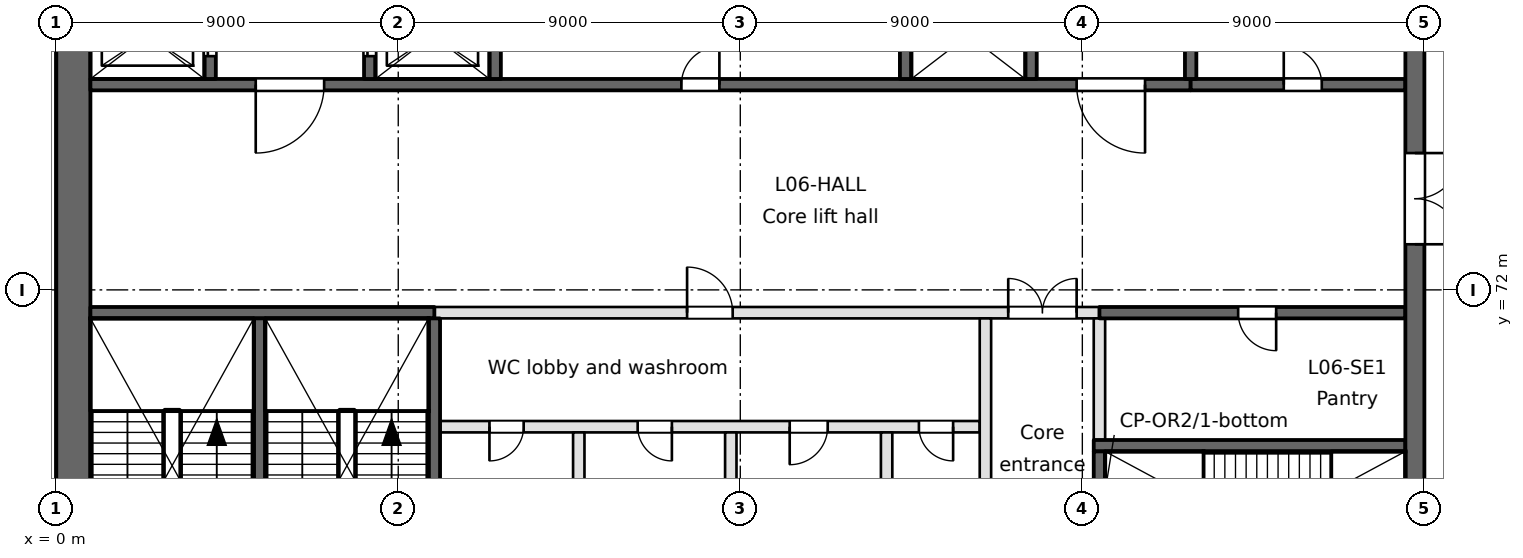
"""IFC4 building model, lengths in metres.
Left out: names, types, materials, properties, quantities, classifications, styles, units other than length and angle.
Written with IfcOpenShell. Run it as: python <this file> out.ifc"""

import sys

from ifc_helpers import new_model, si_unit, direction, frame, frame_2d, origin, place, context, subcontext, project, spatial, rectangle, extrude, element, fill, save


model = new_model("IFC4")
c1 = context("Model", 3, precision=1e-05, world=origin(), true_north=direction((0.0, 1.0)))
c2 = subcontext(c1, "Body", "Model", "MODEL_VIEW")
j1 = project(units=[si_unit("LENGTHUNIT", "METRE"), si_unit("PLANEANGLEUNIT", "RADIAN")], contexts=[c1])
p1 = place(None, origin())
s1 = spatial("IfcSite", under=j1, at=p1, CompositionType="ELEMENT")
p2 = place(p1, origin())
s2 = spatial("IfcBuilding", under=s1, at=p2, CompositionType="ELEMENT")
p3 = place(p2, frame((0.0, 0.0, 31.2)))
s3 = spatial("IfcBuildingStorey", under=s2, at=p3, CompositionType="ELEMENT", Elevation=31.2)
p4 = place(p3, frame((0.45, 94.5, 0.0), z_axis=(0.0, 0.0, 1.0), x_axis=(0.0, -1.0, 0.0)))
e1 = element("IfcWall", 1, at=p4, inside=s3, PredefinedType="SHEAR", context=c2, shape_type="SweptSolid", body=[
    extrude(rectangle(XDim=66.085, YDim=0.9, at=frame_2d((33.042, 0.0))), origin(), (0.0, 0.0, 1.0), 4.6),
])
p5 = place(p3, frame((27.3, 67.9, -0.45), z_axis=(0.0, 0.0, 1.0), x_axis=(1.0, 0.0, 0.0)))
e2 = element("IfcWall", 2, at=p5, inside=s3, PredefinedType="SOLIDWALL", context=c2, shape_type="SweptSolid", body=[
    extrude(rectangle(XDim=8.2, YDim=0.3, at=frame_2d((4.1, 0.0))), origin(), (0.0, 0.0, 1.0), 4.65),
])
p6 = place(p3, frame((10.1, 68.4, 0.0), z_axis=(0.0, 0.0, 1.0), x_axis=(1.0, 0.0, 0.0)))
e3 = element("IfcWall", 3, at=p6, inside=s3, PredefinedType="PARTITIONING", context=c2, shape_type="SweptSolid", body=[
    extrude(rectangle(XDim=14.2, YDim=0.3, at=frame_2d((7.1, 0.0))), origin(), (0.0, 0.0, 1.0), 4.2),
])
p7 = place(p6, frame((1.3, 0.0, 0.0)))
e4 = element("IfcOpeningElement", 4, at=p7, cuts=e3, PredefinedType="OPENING", context=c2, shape_type="SweptSolid", body=[
    extrude(rectangle(XDim=0.9, YDim=2.1, at=frame_2d((0.45, 1.05))), frame((0.0, 0.15, 0.0), z_axis=(0.0, -1.0, 0.0), x_axis=(1.0, 0.0, 0.0)), (0.0, 0.0, 1.0), 0.3),
])
p8 = place(p6, frame((5.2, 0.0, 0.0)))
e5 = element("IfcOpeningElement", 5, at=p8, cuts=e3, PredefinedType="OPENING", context=c2, shape_type="SweptSolid", body=[
    extrude(rectangle(XDim=0.9, YDim=2.1, at=frame_2d((0.45, 1.05))), frame((0.0, 0.15, 0.0), z_axis=(0.0, -1.0, 0.0), x_axis=(1.0, 0.0, 0.0)), (0.0, 0.0, 1.0), 0.3),
])
p9 = place(p6, frame((9.2, 0.0, 0.0)))
e6 = element("IfcOpeningElement", 6, at=p9, cuts=e3, PredefinedType="OPENING", context=c2, shape_type="SweptSolid", body=[
    extrude(rectangle(XDim=1.0, YDim=2.1, at=frame_2d((0.5, 1.05))), frame((0.0, 0.15, 0.0), z_axis=(0.0, -1.0, 0.0), x_axis=(1.0, 0.0, 0.0)), (0.0, 0.0, 1.0), 0.3),
])
p10 = place(p6, frame((12.6, 0.0, 0.0)))
e7 = element("IfcOpeningElement", 7, at=p10, cuts=e3, PredefinedType="OPENING", context=c2, shape_type="SweptSolid", body=[
    extrude(rectangle(XDim=0.9, YDim=2.1, at=frame_2d((0.45, 1.05))), frame((0.0, 0.15, 0.0), z_axis=(0.0, -1.0, 0.0), x_axis=(1.0, 0.0, 0.0)), (0.0, 0.0, 1.0), 0.3),
])
p11 = place(p3, frame((0.9, 71.4, -0.45), z_axis=(0.0, 0.0, 1.0), x_axis=(1.0, 0.0, 0.0)))
e8 = element("IfcWall", 8, at=p11, inside=s3, PredefinedType="SOLIDWALL", context=c2, shape_type="SweptSolid", body=[
    extrude(rectangle(XDim=9.05, YDim=0.3, at=frame_2d((4.525, 0.0))), origin(), (0.0, 0.0, 1.0), 4.65),
])
p12 = place(p3, frame((9.95, 71.4, 0.0), z_axis=(0.0, 0.0, 1.0), x_axis=(1.0, 0.0, 0.0)))
e9 = element("IfcWall", 9, at=p12, inside=s3, PredefinedType="PARTITIONING", context=c2, shape_type="SweptSolid", body=[
    extrude(rectangle(XDim=17.5, YDim=0.3, at=frame_2d((8.75, 0.0))), origin(), (0.0, 0.0, 1.0), 4.2),
])
p13 = place(p12, frame((15.1, 0.0, 0.0)))
e10 = element("IfcOpeningElement", 10, at=p13, cuts=e9, PredefinedType="OPENING", context=c2, shape_type="SweptSolid", body=[
    extrude(rectangle(XDim=1.8, YDim=2.1, at=frame_2d((0.9, 1.05))), frame((0.0, 0.15, 0.0), z_axis=(0.0, -1.0, 0.0), x_axis=(1.0, 0.0, 0.0)), (0.0, 0.0, 1.0), 0.3),
])
p14 = place(p12, frame((6.65, 0.0, 0.0)))
e11 = element("IfcOpeningElement", 11, at=p14, cuts=e9, PredefinedType="OPENING", context=c2, shape_type="SweptSolid", body=[
    extrude(rectangle(XDim=1.2, YDim=2.1, at=frame_2d((0.6, 1.05))), frame((0.0, 0.15, 0.0), z_axis=(0.0, -1.0, 0.0), x_axis=(1.0, 0.0, 0.0)), (0.0, 0.0, 1.0), 0.3),
])
p15 = place(p3, frame((27.45, 71.4, 0.0), z_axis=(0.0, 0.0, 1.0), x_axis=(1.0, 0.0, 0.0)))
e12 = element("IfcWall", 12, at=p15, inside=s3, PredefinedType="SOLIDWALL", context=c2, shape_type="SweptSolid", body=[
    extrude(rectangle(XDim=8.05, YDim=0.3, at=frame_2d((4.025, 0.0))), origin(), (0.0, 0.0, 1.0), 4.2),
])
p16 = place(p15, frame((3.65, 0.0, 0.0)))
e13 = element("IfcOpeningElement", 13, at=p16, cuts=e12, PredefinedType="OPENING", context=c2, shape_type="SweptSolid", body=[
    extrude(rectangle(XDim=1.0, YDim=2.1, at=frame_2d((0.5, 1.05))), frame((0.0, 0.15, 0.0), z_axis=(0.0, -1.0, 0.0), x_axis=(1.0, 0.0, 0.0)), (0.0, 0.0, 1.0), 0.3),
])
p17 = place(p3, frame((0.9, 77.4, -0.45), z_axis=(0.0, 0.0, 1.0), x_axis=(1.0, 0.0, 0.0)))
e14 = element("IfcWall", 14, at=p17, inside=s3, PredefinedType="SOLIDWALL", context=c2, shape_type="SweptSolid", body=[
    extrude(rectangle(XDim=28.95, YDim=0.3, at=frame_2d((14.475, 0.0))), origin(), (0.0, 0.0, 1.0), 4.65),
])
p18 = place(p17, frame((4.35, 0.0, 0.45)))
e15 = element("IfcOpeningElement", 15, at=p18, cuts=e14, PredefinedType="OPENING", context=c2, shape_type="SweptSolid", body=[
    extrude(rectangle(XDim=1.8, YDim=2.1, at=frame_2d((0.9, 1.05))), frame((0.0, 0.15, 0.0), z_axis=(0.0, -1.0, 0.0), x_axis=(1.0, 0.0, 0.0)), (0.0, 0.0, 1.0), 0.3),
])
p19 = place(p17, frame((25.95, 0.0, 0.45)))
e16 = element("IfcOpeningElement", 16, at=p19, cuts=e14, PredefinedType="OPENING", context=c2, shape_type="SweptSolid", body=[
    extrude(rectangle(XDim=1.8, YDim=2.1, at=frame_2d((0.9, 1.05))), frame((0.0, 0.15, 0.0), z_axis=(0.0, -1.0, 0.0), x_axis=(1.0, 0.0, 0.0)), (0.0, 0.0, 1.0), 0.3),
])
p20 = place(p17, frame((15.55, 0.0, 0.45)))
e17 = element("IfcOpeningElement", 17, at=p20, cuts=e14, PredefinedType="OPENING", context=c2, shape_type="SweptSolid", body=[
    extrude(rectangle(XDim=1.0, YDim=2.1, at=frame_2d((0.5, 1.05))), frame((0.0, 0.15, 0.0), z_axis=(0.0, -1.0, 0.0), x_axis=(1.0, 0.0, 0.0)), (0.0, 0.0, 1.0), 0.3),
])
p21 = place(p3, frame((29.85, 77.4, 0.0), z_axis=(0.0, 0.0, 1.0), x_axis=(1.0, 0.0, 0.0)))
e18 = element("IfcWall", 18, at=p21, inside=s3, PredefinedType="SOLIDWALL", context=c2, shape_type="SweptSolid", body=[
    extrude(rectangle(XDim=5.65, YDim=0.3, at=frame_2d((2.825, 0.0))), origin(), (0.0, 0.0, 1.0), 4.2),
])
p22 = place(p21, frame((2.45, 0.0, 0.0)))
e19 = element("IfcOpeningElement", 19, at=p22, cuts=e18, PredefinedType="OPENING", context=c2, shape_type="SweptSolid", body=[
    extrude(rectangle(XDim=1.0, YDim=2.1, at=frame_2d((0.5, 1.05))), frame((0.0, 0.15, 0.0), z_axis=(0.0, -1.0, 0.0), x_axis=(1.0, 0.0, 0.0)), (0.0, 0.0, 1.0), 0.3),
])
p23 = place(p3, frame((4.05, 77.55, -0.45), z_axis=(0.0, 0.0, 1.0), x_axis=(0.0, 1.0, 0.0)))
e20 = element("IfcWall", 20, at=p23, inside=s3, PredefinedType="SOLIDWALL", context=c2, shape_type="SweptSolid", body=[
    extrude(rectangle(XDim=10.1, YDim=0.3, at=frame_2d((5.05, 0.0))), origin(), (0.0, 0.0, 1.0), 4.65),
])
p24 = place(p23, frame((0.6, 0.0, 0.45)))
e21 = element("IfcOpeningElement", 21, at=p24, cuts=e20, PredefinedType="OPENING", context=c2, shape_type="SweptSolid", body=[
    extrude(rectangle(XDim=1.1, YDim=2.1, at=frame_2d((0.55, 1.05))), frame((0.0, 0.15, 0.0), z_axis=(0.0, -1.0, 0.0), x_axis=(1.0, 0.0, 0.0)), (0.0, 0.0, 1.0), 0.3),
])
p25 = place(p23, frame((3.2, 0.0, 0.45)))
e22 = element("IfcOpeningElement", 22, at=p25, cuts=e20, PredefinedType="OPENING", context=c2, shape_type="SweptSolid", body=[
    extrude(rectangle(XDim=1.1, YDim=2.1, at=frame_2d((0.55, 1.05))), frame((0.0, 0.15, 0.0), z_axis=(0.0, -1.0, 0.0), x_axis=(1.0, 0.0, 0.0)), (0.0, 0.0, 1.0), 0.3),
])
p26 = place(p23, frame((5.8, 0.0, 0.45)))
e23 = element("IfcOpeningElement", 23, at=p26, cuts=e20, PredefinedType="OPENING", context=c2, shape_type="SweptSolid", body=[
    extrude(rectangle(XDim=1.1, YDim=2.1, at=frame_2d((0.55, 1.05))), frame((0.0, 0.15, 0.0), z_axis=(0.0, -1.0, 0.0), x_axis=(1.0, 0.0, 0.0)), (0.0, 0.0, 1.0), 0.3),
])
p27 = place(p23, frame((8.4, 0.0, 0.45)))
e24 = element("IfcOpeningElement", 24, at=p27, cuts=e20, PredefinedType="OPENING", context=c2, shape_type="SweptSolid", body=[
    extrude(rectangle(XDim=1.1, YDim=2.1, at=frame_2d((0.55, 1.05))), frame((0.0, 0.15, 0.0), z_axis=(0.0, -1.0, 0.0), x_axis=(1.0, 0.0, 0.0)), (0.0, 0.0, 1.0), 0.3),
])
p28 = place(p3, frame((5.35, 63.5, -0.45), z_axis=(0.0, 0.0, 1.0), x_axis=(0.0, 1.0, 0.0)))
e25 = element("IfcWall", 25, at=p28, inside=s3, PredefinedType="SOLIDWALL", context=c2, shape_type="SweptSolid", body=[
    extrude(rectangle(XDim=7.75, YDim=0.3, at=frame_2d((3.875, 0.0))), origin(), (0.0, 0.0, 1.0), 4.65),
])
p29 = place(p3, frame((8.25, 77.55, -0.45), z_axis=(0.0, 0.0, 1.0), x_axis=(0.0, 1.0, 0.0)))
e26 = element("IfcWall", 26, at=p29, inside=s3, PredefinedType="SOLIDWALL", context=c2, shape_type="SweptSolid", body=[
    extrude(rectangle(XDim=10.1, YDim=0.3, at=frame_2d((5.05, 0.0))), origin(), (0.0, 0.0, 1.0), 4.65),
])
p30 = place(p29, frame((0.6, 0.0, 0.45)))
e27 = element("IfcOpeningElement", 27, at=p30, cuts=e26, PredefinedType="OPENING", context=c2, shape_type="SweptSolid", body=[
    extrude(rectangle(XDim=1.1, YDim=2.1, at=frame_2d((0.55, 1.05))), frame((0.0, 0.15, 0.0), z_axis=(0.0, -1.0, 0.0), x_axis=(1.0, 0.0, 0.0)), (0.0, 0.0, 1.0), 0.3),
])
p31 = place(p29, frame((3.2, 0.0, 0.45)))
e28 = element("IfcOpeningElement", 28, at=p31, cuts=e26, PredefinedType="OPENING", context=c2, shape_type="SweptSolid", body=[
    extrude(rectangle(XDim=1.1, YDim=2.1, at=frame_2d((0.55, 1.05))), frame((0.0, 0.15, 0.0), z_axis=(0.0, -1.0, 0.0), x_axis=(1.0, 0.0, 0.0)), (0.0, 0.0, 1.0), 0.3),
])
p32 = place(p29, frame((5.8, 0.0, 0.45)))
e29 = element("IfcOpeningElement", 29, at=p32, cuts=e26, PredefinedType="OPENING", context=c2, shape_type="SweptSolid", body=[
    extrude(rectangle(XDim=1.1, YDim=2.1, at=frame_2d((0.55, 1.05))), frame((0.0, 0.15, 0.0), z_axis=(0.0, -1.0, 0.0), x_axis=(1.0, 0.0, 0.0)), (0.0, 0.0, 1.0), 0.3),
])
p33 = place(p29, frame((8.4, 0.0, 0.45)))
e30 = element("IfcOpeningElement", 30, at=p33, cuts=e26, PredefinedType="OPENING", context=c2, shape_type="SweptSolid", body=[
    extrude(rectangle(XDim=1.1, YDim=2.1, at=frame_2d((0.55, 1.05))), frame((0.0, 0.15, 0.0), z_axis=(0.0, -1.0, 0.0), x_axis=(1.0, 0.0, 0.0)), (0.0, 0.0, 1.0), 0.3),
])
p34 = place(p3, frame((9.95, 63.5, -0.45), z_axis=(0.0, 0.0, 1.0), x_axis=(0.0, 1.0, 0.0)))
e31 = element("IfcWall", 31, at=p34, inside=s3, PredefinedType="SOLIDWALL", context=c2, shape_type="SweptSolid", body=[
    extrude(rectangle(XDim=7.75, YDim=0.3, at=frame_2d((3.875, 0.0))), origin(), (0.0, 0.0, 1.0), 4.65),
])
p35 = place(p3, frame((11.55, 77.55, -0.45), z_axis=(0.0, 0.0, 1.0), x_axis=(0.0, 1.0, 0.0)))
e32 = element("IfcWall", 32, at=p35, inside=s3, PredefinedType="SOLIDWALL", context=c2, shape_type="SweptSolid", body=[
    extrude(rectangle(XDim=10.1, YDim=0.3, at=frame_2d((5.05, 0.0))), origin(), (0.0, 0.0, 1.0), 4.65),
])
for number, where, z_axis, x_axis in (
    (33, (13.75, 63.5, 0.0), (0.0, 0.0, 1.0), (0.0, 1.0, 0.0)),
    (34, (17.75, 63.5, 0.0), (0.0, 0.0, 1.0), (0.0, 1.0, 0.0)),
    (35, (21.85, 63.5, 0.0), (0.0, 0.0, 1.0), (0.0, 1.0, 0.0)),
):
    element("IfcWall", number, at=place(p3, frame(where, z_axis=z_axis, x_axis=x_axis)), inside=s3, PredefinedType="PARTITIONING", context=c2, shape_type="SweptSolid", body=[
        extrude(rectangle(XDim=4.75, YDim=0.3, at=frame_2d((2.375, 0.0))), origin(), (0.0, 0.0, 1.0), 4.2),
    ])
p36 = place(p3, frame((22.35, 77.55, -0.45), z_axis=(0.0, 0.0, 1.0), x_axis=(0.0, 1.0, 0.0)))
e36 = element("IfcWall", 36, at=p36, inside=s3, PredefinedType="SOLIDWALL", context=c2, shape_type="SweptSolid", body=[
    extrude(rectangle(XDim=10.1, YDim=0.3, at=frame_2d((5.05, 0.0))), origin(), (0.0, 0.0, 1.0), 4.65),
])
p37 = place(p3, frame((24.45, 63.5, 0.0), z_axis=(0.0, 0.0, 1.0), x_axis=(0.0, 1.0, 0.0)))
e37 = element("IfcWall", 37, at=p37, inside=s3, PredefinedType="PARTITIONING", context=c2, shape_type="SweptSolid", body=[
    extrude(rectangle(XDim=7.75, YDim=0.3, at=frame_2d((3.875, 0.0))), origin(), (0.0, 0.0, 1.0), 4.2),
])
p38 = place(p3, frame((25.65, 77.55, -0.45), z_axis=(0.0, 0.0, 1.0), x_axis=(0.0, 1.0, 0.0)))
e38 = element("IfcWall", 38, at=p38, inside=s3, PredefinedType="SOLIDWALL", context=c2, shape_type="SweptSolid", body=[
    extrude(rectangle(XDim=10.1, YDim=0.3, at=frame_2d((5.05, 0.0))), origin(), (0.0, 0.0, 1.0), 4.65),
])
p39 = place(p3, frame((27.45, 63.5, -0.45), z_axis=(0.0, 0.0, 1.0), x_axis=(0.0, 1.0, 0.0)))
e39 = element("IfcWall", 39, at=p39, inside=s3, PredefinedType="SOLIDWALL", context=c2, shape_type="SweptSolid", body=[
    extrude(rectangle(XDim=4.25, YDim=0.3, at=frame_2d((2.125, 0.0))), origin(), (0.0, 0.0, 1.0), 4.65),
])
p40 = place(p3, frame((27.45, 68.05, 0.0), z_axis=(0.0, 0.0, 1.0), x_axis=(0.0, 1.0, 0.0)))
e40 = element("IfcWall", 40, at=p40, inside=s3, PredefinedType="PARTITIONING", context=c2, shape_type="SweptSolid", body=[
    extrude(rectangle(XDim=3.2, YDim=0.3, at=frame_2d((1.6, 0.0))), origin(), (0.0, 0.0, 1.0), 4.2),
])
p41 = place(p3, frame((29.85, 77.55, -0.45), z_axis=(0.0, 0.0, 1.0), x_axis=(0.0, 1.0, 0.0)))
e41 = element("IfcWall", 41, at=p41, inside=s3, PredefinedType="SOLIDWALL", context=c2, shape_type="SweptSolid", body=[
    extrude(rectangle(XDim=10.1, YDim=0.3, at=frame_2d((5.05, 0.0))), origin(), (0.0, 0.0, 1.0), 4.65),
])
p42 = place(p3, frame((35.75, 63.5, -0.45), z_axis=(0.0, 0.0, 1.0), x_axis=(0.0, 1.0, 0.0)))
e42 = element("IfcWall", 42, at=p42, inside=s3, PredefinedType="SOLIDWALL", context=c2, shape_type="SweptSolid", body=[
    extrude(rectangle(XDim=34.6, YDim=0.5, at=frame_2d((17.3, 0.0))), origin(), (0.0, 0.0, 1.0), 4.65),
])
p43 = place(p42, frame((9.7, 0.0, 0.45)))
e43 = element("IfcOpeningElement", 43, at=p43, cuts=e42, PredefinedType="OPENING", context=c2, shape_type="SweptSolid", body=[
    extrude(rectangle(XDim=2.4, YDim=2.1, at=frame_2d((1.2, 1.05))), frame((0.0, 0.25, 0.0), z_axis=(0.0, -1.0, 0.0), x_axis=(1.0, 0.0, 0.0)), (0.0, 0.0, 1.0), 0.5),
])
p44 = place(p42, frame((27.9, 0.0, 0.45)))
e44 = element("IfcOpeningElement", 44, at=p44, cuts=e42, PredefinedType="OPENING", context=c2, shape_type="SweptSolid", body=[
    extrude(rectangle(XDim=1.5, YDim=2.1, at=frame_2d((0.75, 1.05))), frame((0.0, 0.25, 0.0), z_axis=(0.0, -1.0, 0.0), x_axis=(1.0, 0.0, 0.0)), (0.0, 0.0, 1.0), 0.5),
])
p45 = place(p42, frame((1.5, 0.0, 0.45)))
e45 = element("IfcOpeningElement", 45, at=p45, cuts=e42, PredefinedType="OPENING", context=c2, shape_type="SweptSolid", body=[
    extrude(rectangle(XDim=1.2, YDim=2.1, at=frame_2d((0.6, 1.05))), frame((0.0, 0.25, 0.0), z_axis=(0.0, -1.0, 0.0), x_axis=(1.0, 0.0, 0.0)), (0.0, 0.0, 1.0), 0.5),
])
p46 = place(p24, origin())
e46 = element("IfcDoor", 46, at=p46, inside=s3, OperationType="SLIDING_TO_RIGHT", PredefinedType="DOOR", context=c2, shape_type="SweptSolid", body=[
    extrude(rectangle(XDim=1.1, YDim=2.1, at=frame_2d((0.55, 1.05))), frame((0.0, 0.025, 0.0), z_axis=(0.0, -1.0, 0.0), x_axis=(1.0, 0.0, 0.0)), (0.0, 0.0, 1.0), 0.05),
])
fill(e21, e46)
p47 = place(p30, origin())
e47 = element("IfcDoor", 47, at=p47, inside=s3, OperationType="SLIDING_TO_RIGHT", PredefinedType="DOOR", context=c2, shape_type="SweptSolid", body=[
    extrude(rectangle(XDim=1.1, YDim=2.1, at=frame_2d((0.55, 1.05))), frame((0.0, 0.025, 0.0), z_axis=(0.0, -1.0, 0.0), x_axis=(1.0, 0.0, 0.0)), (0.0, 0.0, 1.0), 0.05),
])
fill(e27, e47)
p48 = place(p18, frame((1.8, 0.0, 0.0), z_axis=(0.0, 0.0, 1.0), x_axis=(-1.0, 0.0, 0.0)))
e48 = element("IfcDoor", 48, at=p48, inside=s3, OperationType="SINGLE_SWING_RIGHT", PredefinedType="DOOR", context=c2, shape_type="SweptSolid", body=[
    extrude(rectangle(XDim=1.8, YDim=2.1, at=frame_2d((0.9, 1.05))), frame((0.0, 0.025, 0.0), z_axis=(0.0, -1.0, 0.0), x_axis=(1.0, 0.0, 0.0)), (0.0, 0.0, 1.0), 0.05),
])
fill(e15, e48)
p49 = place(p19, frame((1.8, 0.0, 0.0), z_axis=(0.0, 0.0, 1.0), x_axis=(-1.0, 0.0, 0.0)))
e49 = element("IfcDoor", 49, at=p49, inside=s3, OperationType="SINGLE_SWING_LEFT", PredefinedType="DOOR", context=c2, shape_type="SweptSolid", body=[
    extrude(rectangle(XDim=1.8, YDim=2.1, at=frame_2d((0.9, 1.05))), frame((0.0, 0.025, 0.0), z_axis=(0.0, -1.0, 0.0), x_axis=(1.0, 0.0, 0.0)), (0.0, 0.0, 1.0), 0.05),
])
fill(e16, e49)
p50 = place(p43, frame((2.4, 0.0, 0.0), z_axis=(0.0, 0.0, 1.0), x_axis=(-1.0, 0.0, 0.0)))
e50 = element("IfcDoor", 50, at=p50, inside=s3, OperationType="DOUBLE_DOOR_SINGLE_SWING", PredefinedType="DOOR", context=c2, shape_type="SweptSolid", body=[
    extrude(rectangle(XDim=2.4, YDim=2.1, at=frame_2d((1.2, 1.05))), frame((0.0, 0.025, 0.0), z_axis=(0.0, -1.0, 0.0), x_axis=(1.0, 0.0, 0.0)), (0.0, 0.0, 1.0), 0.05),
])
fill(e43, e50)
p51 = place(p13, origin())
e51 = element("IfcDoor", 51, at=p51, inside=s3, OperationType="DOUBLE_DOOR_SINGLE_SWING", PredefinedType="DOOR", context=c2, shape_type="SweptSolid", body=[
    extrude(rectangle(XDim=1.8, YDim=2.1, at=frame_2d((0.9, 1.05))), frame((0.0, 0.025, 0.0), z_axis=(0.0, -1.0, 0.0), x_axis=(1.0, 0.0, 0.0)), (0.0, 0.0, 1.0), 0.05),
])
fill(e10, e51)
p52 = place(p7, frame((0.9, 0.0, 0.0), z_axis=(0.0, 0.0, 1.0), x_axis=(-1.0, 0.0, 0.0)))
e52 = element("IfcDoor", 52, at=p52, inside=s3, OperationType="SINGLE_SWING_RIGHT", PredefinedType="DOOR", context=c2, shape_type="SweptSolid", body=[
    extrude(rectangle(XDim=0.9, YDim=2.1, at=frame_2d((0.45, 1.05))), frame((0.0, 0.025, 0.0), z_axis=(0.0, -1.0, 0.0), x_axis=(1.0, 0.0, 0.0)), (0.0, 0.0, 1.0), 0.05),
])
fill(e4, e52)
p53 = place(p8, frame((0.9, 0.0, 0.0), z_axis=(0.0, 0.0, 1.0), x_axis=(-1.0, 0.0, 0.0)))
e53 = element("IfcDoor", 53, at=p53, inside=s3, OperationType="SINGLE_SWING_LEFT", PredefinedType="DOOR", context=c2, shape_type="SweptSolid", body=[
    extrude(rectangle(XDim=0.9, YDim=2.1, at=frame_2d((0.45, 1.05))), frame((0.0, 0.025, 0.0), z_axis=(0.0, -1.0, 0.0), x_axis=(1.0, 0.0, 0.0)), (0.0, 0.0, 1.0), 0.05),
])
fill(e5, e53)
p54 = place(p9, frame((1.0, 0.0, 0.0), z_axis=(0.0, 0.0, 1.0), x_axis=(-1.0, 0.0, 0.0)))
e54 = element("IfcDoor", 54, at=p54, inside=s3, OperationType="SINGLE_SWING_RIGHT", PredefinedType="DOOR", context=c2, shape_type="SweptSolid", body=[
    extrude(rectangle(XDim=1.0, YDim=2.1, at=frame_2d((0.5, 1.05))), frame((0.0, 0.025, 0.0), z_axis=(0.0, -1.0, 0.0), x_axis=(1.0, 0.0, 0.0)), (0.0, 0.0, 1.0), 0.05),
])
fill(e6, e54)
p55 = place(p10, frame((0.9, 0.0, 0.0), z_axis=(0.0, 0.0, 1.0), x_axis=(-1.0, 0.0, 0.0)))
e55 = element("IfcDoor", 55, at=p55, inside=s3, OperationType="SINGLE_SWING_LEFT", PredefinedType="DOOR", context=c2, shape_type="SweptSolid", body=[
    extrude(rectangle(XDim=0.9, YDim=2.1, at=frame_2d((0.45, 1.05))), frame((0.0, 0.025, 0.0), z_axis=(0.0, -1.0, 0.0), x_axis=(1.0, 0.0, 0.0)), (0.0, 0.0, 1.0), 0.05),
])
fill(e7, e55)
p56 = place(p14, origin())
e56 = element("IfcDoor", 56, at=p56, inside=s3, OperationType="SINGLE_SWING_LEFT", PredefinedType="DOOR", context=c2, shape_type="SweptSolid", body=[
    extrude(rectangle(XDim=1.2, YDim=2.1, at=frame_2d((0.6, 1.05))), frame((0.0, 0.025, 0.0), z_axis=(0.0, -1.0, 0.0), x_axis=(1.0, 0.0, 0.0)), (0.0, 0.0, 1.0), 0.05),
])
fill(e11, e56)
p57 = place(p16, frame((1.0, 0.0, 0.0), z_axis=(0.0, 0.0, 1.0), x_axis=(-1.0, 0.0, 0.0)))
e57 = element("IfcDoor", 57, at=p57, inside=s3, OperationType="SINGLE_SWING_LEFT", PredefinedType="DOOR", context=c2, shape_type="SweptSolid", body=[
    extrude(rectangle(XDim=1.0, YDim=2.1, at=frame_2d((0.5, 1.05))), frame((0.0, 0.025, 0.0), z_axis=(0.0, -1.0, 0.0), x_axis=(1.0, 0.0, 0.0)), (0.0, 0.0, 1.0), 0.05),
])
fill(e13, e57)
p58 = place(p20, origin())
e58 = element("IfcDoor", 58, at=p58, inside=s3, OperationType="SINGLE_SWING_RIGHT", PredefinedType="DOOR", context=c2, shape_type="SweptSolid", body=[
    extrude(rectangle(XDim=1.0, YDim=2.1, at=frame_2d((0.5, 1.05))), frame((0.0, 0.025, 0.0), z_axis=(0.0, -1.0, 0.0), x_axis=(1.0, 0.0, 0.0)), (0.0, 0.0, 1.0), 0.05),
])
fill(e17, e58)
p59 = place(p22, origin())
e59 = element("IfcDoor", 59, at=p59, inside=s3, OperationType="SINGLE_SWING_LEFT", PredefinedType="DOOR", context=c2, shape_type="SweptSolid", body=[
    extrude(rectangle(XDim=1.0, YDim=2.1, at=frame_2d((0.5, 1.05))), frame((0.0, 0.025, 0.0), z_axis=(0.0, -1.0, 0.0), x_axis=(1.0, 0.0, 0.0)), (0.0, 0.0, 1.0), 0.05),
])
fill(e19, e59)
save(model, sys.argv[1])
